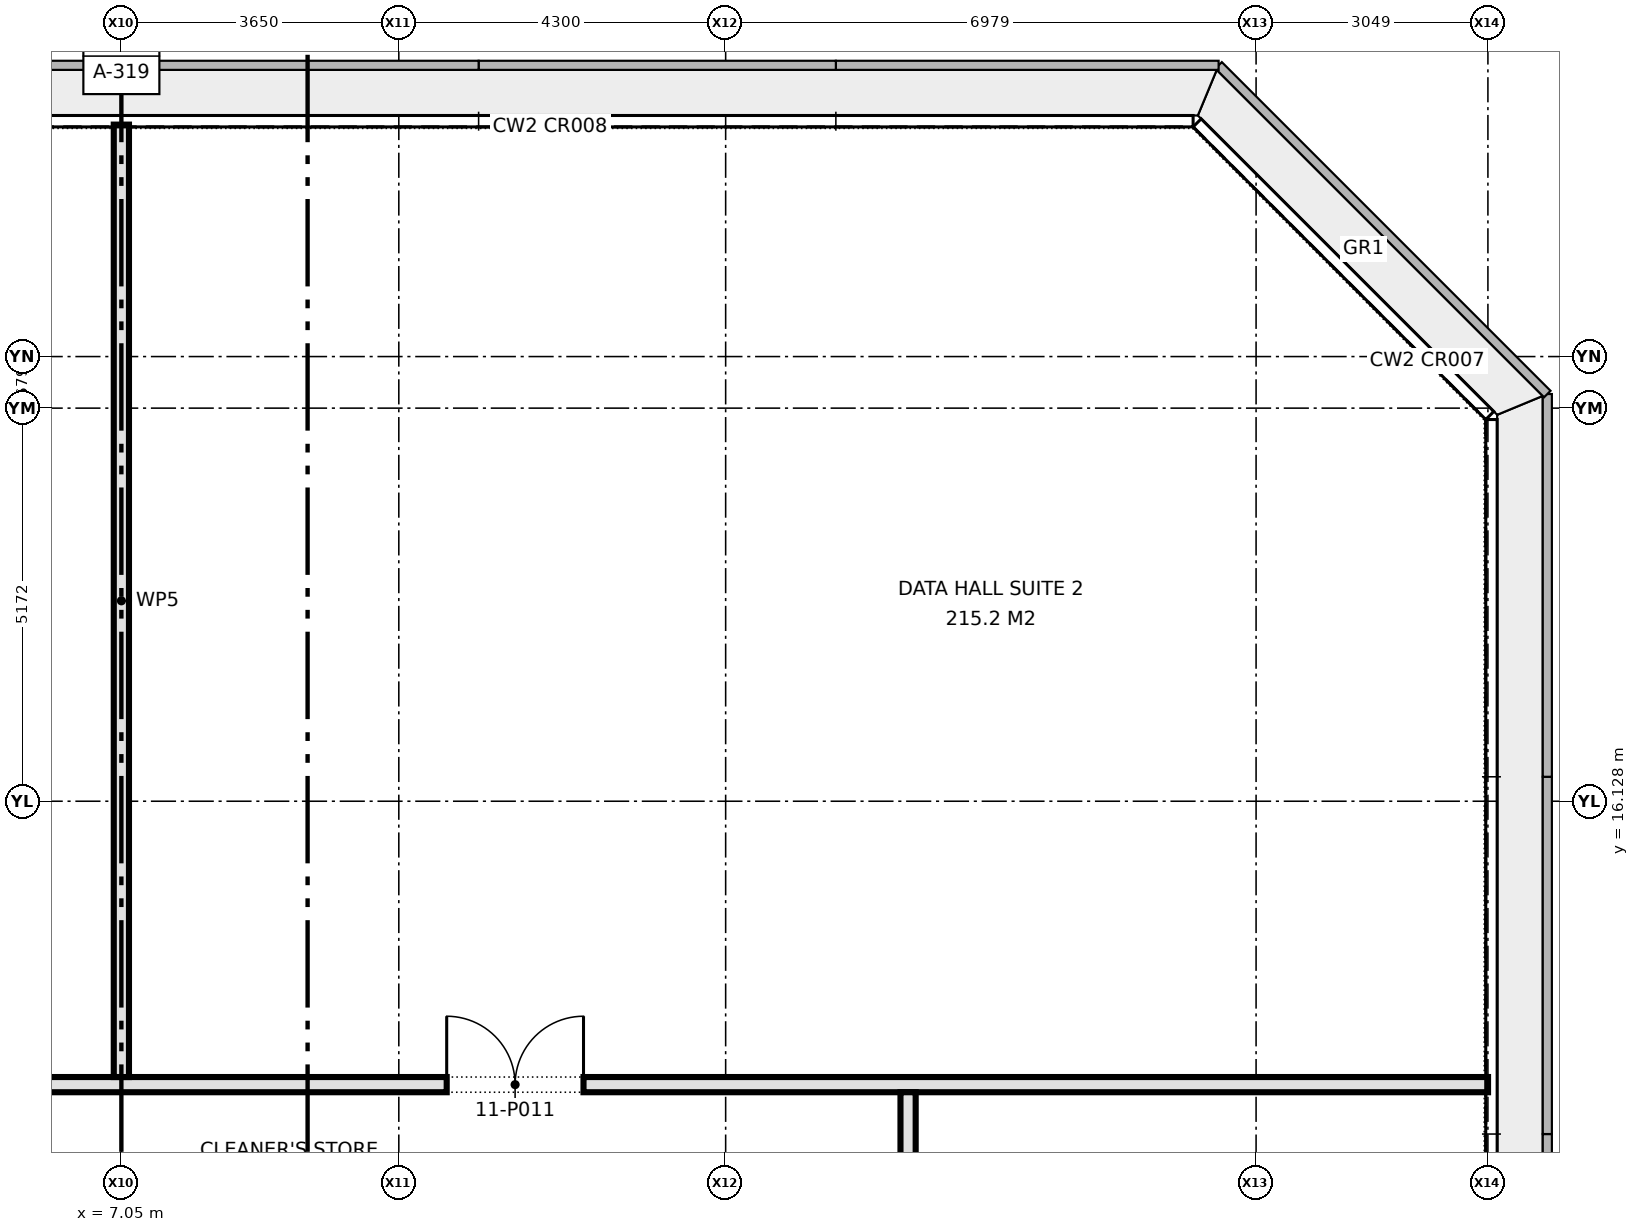
"""IFC4 building model, lengths in metres.
Left out: names, types, materials, properties, quantities, classifications, styles, units other than length and angle.
Written with IfcOpenShell. Run it as: python <this file> out.ifc"""

import sys

from ifc_helpers import new_model, si_unit, direction, frame, frame_2d, origin, place, context, subcontext, project, spatial, rectangle, extrude, element, fill, save


model = new_model("IFC4")
c1 = context("Model", 3, precision=1e-05, world=origin(), true_north=direction((0.0, 1.0)))
c2 = subcontext(c1, "Body", "Model", "MODEL_VIEW")
j1 = project(units=[si_unit("LENGTHUNIT", "METRE"), si_unit("PLANEANGLEUNIT", "RADIAN")], contexts=[c1])
p1 = place(None, origin())
s1 = spatial("IfcSite", under=j1, at=p1, CompositionType="ELEMENT")
p2 = place(p1, origin())
s2 = spatial("IfcBuilding", under=s1, at=p2, CompositionType="ELEMENT")
p3 = place(p2, frame((0.0, 0.0, 49.7)))
s3 = spatial("IfcBuildingStorey", under=s2, at=p3, CompositionType="ELEMENT", Elevation=49.7)
p4 = place(p3, frame((-25.03, 12.4, 0.0), z_axis=(0.0, 0.0, 1.0), x_axis=(1.0, 0.0, 0.0)))
e1 = element("IfcWall", 1, at=p4, inside=s3, PredefinedType="PARTITIONING", context=c2, shape_type="SweptSolid", body=[
    extrude(rectangle(XDim=50.06, YDim=0.2, at=frame_2d((25.03, 0.0))), origin(), (0.0, 0.0, 1.0), 4.575),
])
p5 = place(p4, frame((10.805, 0.0, 0.0)))
e2 = element("IfcOpeningElement", 2, at=p5, cuts=e1, PredefinedType="OPENING", context=c2, shape_type="SweptSolid", body=[
    extrude(rectangle(XDim=1.8, YDim=2.1, at=frame_2d((0.9, 1.05))), frame((0.0, 0.11, 0.0), z_axis=(0.0, -1.0, 0.0), x_axis=(1.0, 0.0, 0.0)), (0.0, 0.0, 1.0), 0.22),
])
p6 = place(p4, frame((8.28, 0.0, 0.0)))
e3 = element("IfcOpeningElement", 3, at=p6, cuts=e1, PredefinedType="OPENING", context=c2, shape_type="SweptSolid", body=[
    extrude(rectangle(XDim=1.2, YDim=2.1, at=frame_2d((0.6, 1.05))), frame((0.0, 0.11, 0.0), z_axis=(0.0, -1.0, 0.0), x_axis=(1.0, 0.0, 0.0)), (0.0, 0.0, 1.0), 0.22),
])
p7 = place(p4, frame((21.78, 0.0, 0.0)))
e4 = element("IfcOpeningElement", 4, at=p7, cuts=e1, PredefinedType="OPENING", context=c2, shape_type="SweptSolid", body=[
    extrude(rectangle(XDim=1.8, YDim=2.1, at=frame_2d((0.9, 1.05))), frame((0.0, 0.11, 0.0), z_axis=(0.0, -1.0, 0.0), x_axis=(1.0, 0.0, 0.0)), (0.0, 0.0, 1.0), 0.22),
])
p8 = place(p4, frame((36.36, 0.0, 0.0)))
e5 = element("IfcOpeningElement", 5, at=p8, cuts=e1, PredefinedType="OPENING", context=c2, shape_type="SweptSolid", body=[
    extrude(rectangle(XDim=1.8, YDim=2.1, at=frame_2d((0.9, 1.05))), frame((0.0, 0.11, 0.0), z_axis=(0.0, -1.0, 0.0), x_axis=(1.0, 0.0, 0.0)), (0.0, 0.0, 1.0), 0.22),
])
p9 = place(p3, frame((17.4, -12.3, 0.0), z_axis=(0.0, 0.0, 1.0), x_axis=(0.0, 1.0, 0.0)))
e6 = element("IfcWall", 6, at=p9, inside=s3, PredefinedType="PARTITIONING", context=c2, shape_type="SweptSolid", body=[
    extrude(rectangle(XDim=24.6, YDim=0.2, at=frame_2d((12.3, 0.0))), origin(), (0.0, 0.0, 1.0), 4.575),
])
p10 = place(p9, frame((4.025, 0.0, 0.0)))
e7 = element("IfcOpeningElement", 7, at=p10, cuts=e6, PredefinedType="OPENING", context=c2, shape_type="SweptSolid", body=[
    extrude(rectangle(XDim=1.8, YDim=2.1, at=frame_2d((0.9, 1.05))), frame((0.0, 0.11, 0.0), z_axis=(0.0, -1.0, 0.0), x_axis=(1.0, 0.0, 0.0)), (0.0, 0.0, 1.0), 0.22),
])
p11 = place(p9, frame((14.05, 0.0, 0.0)))
e8 = element("IfcOpeningElement", 8, at=p11, cuts=e6, PredefinedType="OPENING", context=c2, shape_type="SweptSolid", body=[
    extrude(rectangle(XDim=1.2, YDim=2.1, at=frame_2d((0.6, 1.05))), frame((0.0, 0.11, 0.0), z_axis=(0.0, -1.0, 0.0), x_axis=(1.0, 0.0, 0.0)), (0.0, 0.0, 1.0), 0.22),
])
p12 = place(p9, frame((21.125, 0.0, 0.0)))
e9 = element("IfcOpeningElement", 9, at=p12, cuts=e6, PredefinedType="OPENING", context=c2, shape_type="SweptSolid", body=[
    extrude(rectangle(XDim=1.8, YDim=2.1, at=frame_2d((0.9, 1.05))), frame((0.0, 0.11, 0.0), z_axis=(0.0, -1.0, 0.0), x_axis=(1.0, 0.0, 0.0)), (0.0, 0.0, 1.0), 0.22),
])
p13 = place(p3, frame((7.05, 12.5, 0.0), z_axis=(0.0, 0.0, 1.0), x_axis=(0.0, 1.0, 0.0)))
e10 = element("IfcWall", 10, at=p13, inside=s3, PredefinedType="PARTITIONING", context=c2, shape_type="SweptSolid", body=[
    extrude(rectangle(XDim=12.53, YDim=0.2, at=frame_2d((6.265, 0.0))), origin(), (0.0, 0.0, 1.0), 4.575),
])
p14 = place(p8, origin())
e11 = element("IfcDoor", 11, at=p14, inside=s3, OperationType="DOUBLE_DOOR_SINGLE_SWING", PredefinedType="DOOR", context=c2, shape_type="SweptSolid", body=[
    extrude(rectangle(XDim=1.8, YDim=2.1, at=frame_2d((0.9, 1.05))), frame((0.0, 0.025, 0.0), z_axis=(0.0, -1.0, 0.0), x_axis=(1.0, 0.0, 0.0)), (0.0, 0.0, 1.0), 0.05),
])
fill(e5, e11)
save(model, sys.argv[1])
